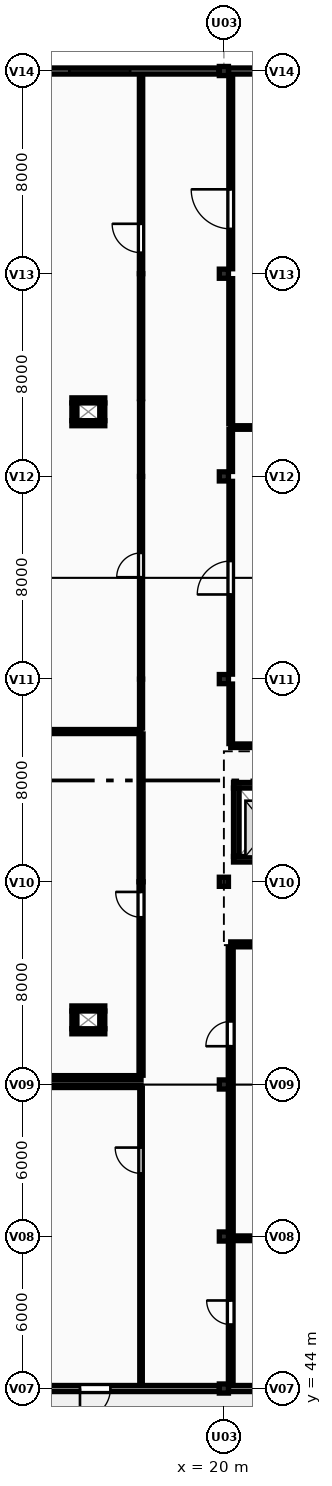
"""IFC4 building model, lengths in metres.
Left out: names, types, materials, properties, quantities, classifications, styles, units other than length and angle.
Written with IfcOpenShell. Run it as: python <this file> out.ifc"""

import sys

from ifc_helpers import new_model, si_unit, direction, frame, frame_2d, origin, origin_2d, place, context, subcontext, project, spatial, rectangle, extrude, element, fill, save


model = new_model("IFC4")
c1 = context("Model", 3, precision=1e-05, world=origin(), true_north=direction((0.0, 1.0)))
c2 = subcontext(c1, "Body", "Model", "MODEL_VIEW")
j1 = project(units=[si_unit("LENGTHUNIT", "METRE"), si_unit("PLANEANGLEUNIT", "RADIAN")], contexts=[c1])
p1 = place(None, origin())
s1 = spatial("IfcSite", under=j1, at=p1, CompositionType="ELEMENT")
p2 = place(p1, origin())
s2 = spatial("IfcBuilding", under=s1, at=p2, CompositionType="ELEMENT")
p3 = place(p2, frame((0.0, 0.0, 8.4)))
s3 = spatial("IfcBuildingStorey", under=s2, at=p3, CompositionType="ELEMENT", Elevation=8.4)
for number, where, z_axis, x_axis in (
    (1, (20.0, 44.0, 0.0), (0.0, 0.0, 1.0), (1.0, 0.0, 0.0)),
    (2, (20.0, 50.0, 0.0), (0.0, 0.0, 1.0), (1.0, 0.0, 0.0)),
    (3, (20.0, 56.0, 0.0), (0.0, 0.0, 1.0), (1.0, 0.0, 0.0)),
    (4, (20.0, 64.0, 0.0), (0.0, 0.0, 1.0), (1.0, 0.0, 0.0)),
    (5, (20.0, 72.0, 0.0), (0.0, 0.0, 1.0), (1.0, 0.0, 0.0)),
    (6, (20.0, 80.0, 0.0), (0.0, 0.0, 1.0), (1.0, 0.0, 0.0)),
    (7, (20.0, 88.0, 0.0), (0.0, 0.0, 1.0), (1.0, 0.0, 0.0)),
    (8, (20.0, 96.0, 0.0), (0.0, 0.0, 1.0), (1.0, 0.0, 0.0)),
):
    element("IfcColumn", number, at=place(p3, frame(where, z_axis=z_axis, x_axis=x_axis)), inside=s3, PredefinedType="COLUMN", context=c2, shape_type="SweptSolid", body=[
        extrude(rectangle(XDim=0.36, YDim=0.36, at=origin_2d()), origin(), (0.0, 0.0, 1.0), 3.9),
    ])
p4 = place(p3, frame((12.18, 96.0, 0.0), z_axis=(0.0, 0.0, 1.0), x_axis=(1.0, 0.0, 0.0)))
e9 = element("IfcWall", 9, at=p4, inside=s3, PredefinedType="SOLIDWALL", context=c2, shape_type="SweptSolid", body=[
    extrude(rectangle(XDim=7.64, YDim=0.24, at=frame_2d((3.82, 0.0))), origin(), (0.0, 0.0, 1.0), 3.09),
])
p5 = place(p4, frame((1.72, 0.0, 0.95)))
e10 = element("IfcOpeningElement", 10, at=p5, cuts=e9, PredefinedType="OPENING", context=c2, shape_type="SweptSolid", body=[
    extrude(rectangle(XDim=2.4, YDim=1.5, at=frame_2d((1.2, 0.75))), frame((0.0, 0.13, 0.0), z_axis=(0.0, -1.0, 0.0), x_axis=(1.0, 0.0, 0.0)), (0.0, 0.0, 1.0), 0.26),
])
p6 = place(p3, frame((20.18, 96.0, 0.0), z_axis=(0.0, 0.0, 1.0), x_axis=(1.0, 0.0, 0.0)))
e11 = element("IfcWall", 11, at=p6, inside=s3, PredefinedType="SOLIDWALL", context=c2, shape_type="SweptSolid", body=[
    extrude(rectangle(XDim=7.64, YDim=0.24, at=frame_2d((3.82, 0.0))), origin(), (0.0, 0.0, 1.0), 3.09),
])
p7 = place(p6, frame((3.22, 0.0, 0.95)))
e12 = element("IfcOpeningElement", 12, at=p7, cuts=e11, PredefinedType="OPENING", context=c2, shape_type="SweptSolid", body=[
    extrude(rectangle(XDim=1.2, YDim=1.65, at=frame_2d((0.6, 0.825))), frame((0.0, 0.13, 0.0), z_axis=(0.0, -1.0, 0.0), x_axis=(1.0, 0.0, 0.0)), (0.0, 0.0, 1.0), 0.26),
])
p8 = place(p3, frame((27.82, 44.0, 0.0), z_axis=(0.0, 0.0, 1.0), x_axis=(-1.0, 0.0, 0.0)))
e13 = element("IfcWall", 13, at=p8, inside=s3, PredefinedType="SOLIDWALL", context=c2, shape_type="SweptSolid", body=[
    extrude(rectangle(XDim=7.64, YDim=0.24, at=frame_2d((3.82, 0.0))), origin(), (0.0, 0.0, 1.0), 3.088),
])
p9 = place(p8, frame((2.57, 0.0, 0.95)))
e14 = element("IfcOpeningElement", 14, at=p9, cuts=e13, PredefinedType="OPENING", context=c2, shape_type="SweptSolid", body=[
    extrude(rectangle(XDim=2.5, YDim=1.65, at=frame_2d((1.25, 0.825))), frame((0.0, 0.13, 0.0), z_axis=(0.0, -1.0, 0.0), x_axis=(1.0, 0.0, 0.0)), (0.0, 0.0, 1.0), 0.26),
])
p10 = place(p3, frame((19.82, 44.0, 0.0), z_axis=(0.0, 0.0, 1.0), x_axis=(-1.0, 0.0, 0.0)))
e15 = element("IfcWall", 15, at=p10, inside=s3, PredefinedType="SOLIDWALL", context=c2, shape_type="SweptSolid", body=[
    extrude(rectangle(XDim=7.64, YDim=0.24, at=frame_2d((3.82, 0.0))), origin(), (0.0, 0.0, 1.0), 3.088),
])
p11 = place(p10, frame((4.3, 0.0, 0.0)))
e16 = element("IfcOpeningElement", 16, at=p11, cuts=e15, PredefinedType="OPENING", context=c2, shape_type="SweptSolid", body=[
    extrude(rectangle(XDim=1.2, YDim=2.15, at=frame_2d((0.6, 1.075))), frame((0.0, 0.13, 0.0), z_axis=(0.0, -1.0, 0.0), x_axis=(1.0, 0.0, 0.0)), (0.0, 0.0, 1.0), 0.26),
])
p12 = place(p3, frame((23.12, 64.89, 0.0), z_axis=(0.0, 0.0, 1.0), x_axis=(-1.0, 0.0, 0.0)))
e17 = element("IfcWall", 17, at=p12, inside=s3, PredefinedType="SHEAR", context=c2, shape_type="SweptSolid", body=[
    extrude(rectangle(XDim=2.74, YDim=0.22, at=frame_2d((1.37, 0.0))), origin(), (0.0, 0.0, 1.0), 3.65),
])
p13 = place(p12, frame((0.87, 0.0, 0.0)))
e18 = element("IfcOpeningElement", 18, at=p13, cuts=e17, PredefinedType="OPENING", context=c2, shape_type="SweptSolid", body=[
    extrude(rectangle(XDim=1.0, YDim=2.15, at=frame_2d((0.5, 1.075))), frame((0.0, 0.12, 0.0), z_axis=(0.0, -1.0, 0.0), x_axis=(1.0, 0.0, 0.0)), (0.0, 0.0, 1.0), 0.24),
])
p14 = place(p3, frame((20.38, 67.81, 0.0), z_axis=(0.0, 0.0, 1.0), x_axis=(1.0, 0.0, 0.0)))
e19 = element("IfcWall", 19, at=p14, inside=s3, PredefinedType="SHEAR", context=c2, shape_type="SweptSolid", body=[
    extrude(rectangle(XDim=2.74, YDim=0.22, at=frame_2d((1.37, 0.0))), origin(), (0.0, 0.0, 1.0), 3.65),
])
p15 = place(p3, frame((20.49, 65.0, 0.0), z_axis=(0.0, 0.0, 1.0), x_axis=(0.0, 1.0, 0.0)))
e20 = element("IfcWall", 20, at=p15, inside=s3, PredefinedType="SHEAR", context=c2, shape_type="SweptSolid", body=[
    extrude(rectangle(XDim=2.7, YDim=0.22, at=frame_2d((1.35, 0.0))), origin(), (0.0, 0.0, 1.0), 3.65),
])
for number, where, z_axis, x_axis in (
    (21, (15.3, 58.1, 0.0), (0.0, 0.0, 1.0), (-1.0, 0.0, 0.0)),
    (22, (14.0, 59.0, 0.0), (0.0, 0.0, 1.0), (1.0, 0.0, 0.0)),
):
    element("IfcWall", number, at=place(p3, frame(where, z_axis=z_axis, x_axis=x_axis)), inside=s3, PredefinedType="PARTITIONING", context=c2, shape_type="SweptSolid", body=[
        extrude(rectangle(XDim=1.3, YDim=0.2, at=frame_2d((0.65, 0.0))), origin(), (0.0, 0.0, 1.0), 3.65),
    ])
for number, where, z_axis, x_axis in (
    (23, (14.1, 58.2, 0.0), (0.0, 0.0, 1.0), (0.0, 1.0, 0.0)),
    (24, (15.2, 58.9, 0.0), (0.0, 0.0, 1.0), (0.0, -1.0, 0.0)),
):
    element("IfcWall", number, at=place(p3, frame(where, z_axis=z_axis, x_axis=x_axis)), inside=s3, PredefinedType="PARTITIONING", context=c2, shape_type="SweptSolid", body=[
        extrude(rectangle(XDim=0.7, YDim=0.2, at=frame_2d((0.35, 0.0))), origin(), (0.0, 0.0, 1.0), 3.65),
    ])
for number, where, z_axis, x_axis in (
    (25, (15.3, 82.1, 0.0), (0.0, 0.0, 1.0), (-1.0, 0.0, 0.0)),
    (26, (14.0, 83.0, 0.0), (0.0, 0.0, 1.0), (1.0, 0.0, 0.0)),
):
    element("IfcWall", number, at=place(p3, frame(where, z_axis=z_axis, x_axis=x_axis)), inside=s3, PredefinedType="PARTITIONING", context=c2, shape_type="SweptSolid", body=[
        extrude(rectangle(XDim=1.3, YDim=0.2, at=frame_2d((0.65, 0.0))), origin(), (0.0, 0.0, 1.0), 3.65),
    ])
for number, where, z_axis, x_axis in (
    (27, (14.1, 82.2, 0.0), (0.0, 0.0, 1.0), (0.0, 1.0, 0.0)),
    (28, (15.2, 82.9, 0.0), (0.0, 0.0, 1.0), (0.0, -1.0, 0.0)),
):
    element("IfcWall", number, at=place(p3, frame(where, z_axis=z_axis, x_axis=x_axis)), inside=s3, PredefinedType="PARTITIONING", context=c2, shape_type="SweptSolid", body=[
        extrude(rectangle(XDim=0.7, YDim=0.2, at=frame_2d((0.35, 0.0))), origin(), (0.0, 0.0, 1.0), 3.65),
    ])
p16 = place(p3, frame((12.195, 56.27, 0.0), z_axis=(0.0, 0.0, 1.0), x_axis=(1.0, 0.0, 0.0)))
e29 = element("IfcWall", 29, at=p16, inside=s3, PredefinedType="PARTITIONING", context=c2, shape_type="SweptSolid", body=[
    extrude(rectangle(XDim=4.535, YDim=0.16, at=frame_2d((2.268, 0.0))), origin(), (0.0, 0.0, 1.0), 3.088),
])
p17 = place(p3, frame((12.0, 69.93, 0.0), z_axis=(0.0, 0.0, 1.0), x_axis=(1.0, 0.0, 0.0)))
e30 = element("IfcWall", 30, at=p17, inside=s3, PredefinedType="PARTITIONING", context=c2, shape_type="SweptSolid", body=[
    extrude(rectangle(XDim=4.73, YDim=0.16, at=frame_2d((2.365, 0.0))), origin(), (0.0, 0.0, 1.0), 3.65),
])
p18 = place(p3, frame((16.73, 56.365, 0.0), z_axis=(0.0, 0.0, 1.0), x_axis=(0.0, 1.0, 0.0)))
e31 = element("IfcWall", 31, at=p18, inside=s3, PredefinedType="PARTITIONING", context=c2, shape_type="SweptSolid", body=[
    extrude(rectangle(XDim=7.635, YDim=0.16, at=frame_2d((3.817, 0.0))), origin(), (0.0, 0.0, 1.0), 3.65),
])
p19 = place(p18, frame((6.235, 0.0, 0.0)))
e32 = element("IfcOpeningElement", 32, at=p19, cuts=e31, PredefinedType="OPENING", context=c2, shape_type="SweptSolid", body=[
    extrude(rectangle(XDim=1.0, YDim=2.15, at=frame_2d((0.5, 1.075))), frame((0.0, 0.09, 0.0), z_axis=(0.0, -1.0, 0.0), x_axis=(1.0, 0.0, 0.0)), (0.0, 0.0, 1.0), 0.18),
])
p20 = place(p3, frame((16.73, 64.0, 0.0), z_axis=(0.0, 0.0, 1.0), x_axis=(0.0, 1.0, 0.0)))
e33 = element("IfcWall", 33, at=p20, inside=s3, PredefinedType="PARTITIONING", context=c2, shape_type="SweptSolid", body=[
    extrude(rectangle(XDim=5.835, YDim=0.16, at=frame_2d((2.917, 0.0))), origin(), (0.0, 0.0, 1.0), 3.65),
])
p21 = place(p3, frame((16.73, 70.07, 0.0), z_axis=(0.0, 0.0, 1.0), x_axis=(0.0, 1.0, 0.0)))
e34 = element("IfcWall", 34, at=p21, inside=s3, PredefinedType="PARTITIONING", context=c2, shape_type="SweptSolid", body=[
    extrude(rectangle(XDim=1.93, YDim=0.12, at=frame_2d((0.965, 0.0))), origin(), (0.0, 0.0, 1.0), 3.65),
])
p22 = place(p3, frame((16.73, 72.0, 0.0), z_axis=(0.0, 0.0, 1.0), x_axis=(0.0, 1.0, 0.0)))
e35 = element("IfcWall", 35, at=p22, inside=s3, PredefinedType="PARTITIONING", context=c2, shape_type="SweptSolid", body=[
    extrude(rectangle(XDim=8.0, YDim=0.12, at=frame_2d((4.0, 0.0))), origin(), (0.0, 0.0, 1.0), 3.65),
])
p23 = place(p22, frame((4.02, 0.0, 0.0)))
e36 = element("IfcOpeningElement", 36, at=p23, cuts=e35, PredefinedType="OPENING", context=c2, shape_type="SweptSolid", body=[
    extrude(rectangle(XDim=0.96, YDim=2.15, at=frame_2d((0.48, 1.075))), frame((0.0, 0.07, 0.0), z_axis=(0.0, -1.0, 0.0), x_axis=(1.0, 0.0, 0.0)), (0.0, 0.0, 1.0), 0.14),
])
p24 = place(p3, frame((16.73, 80.0, 0.0), z_axis=(0.0, 0.0, 1.0), x_axis=(0.0, 1.0, 0.0)))
e37 = element("IfcWall", 37, at=p24, inside=s3, PredefinedType="PARTITIONING", context=c2, shape_type="SweptSolid", body=[
    extrude(rectangle(XDim=2.93, YDim=0.12, at=frame_2d((1.465, 0.0))), origin(), (0.0, 0.0, 1.0), 3.65),
])
p25 = place(p3, frame((16.73, 83.07, 0.0), z_axis=(0.0, 0.0, 1.0), x_axis=(0.0, 1.0, 0.0)))
e38 = element("IfcWall", 38, at=p25, inside=s3, PredefinedType="PARTITIONING", context=c2, shape_type="SweptSolid", body=[
    extrude(rectangle(XDim=4.93, YDim=0.13, at=frame_2d((2.465, 0.0))), origin(), (0.0, 0.0, 1.0), 3.65),
])
p26 = place(p3, frame((16.73, 88.0, 0.0), z_axis=(0.0, 0.0, 1.0), x_axis=(0.0, 1.0, 0.0)))
e39 = element("IfcWall", 39, at=p26, inside=s3, PredefinedType="PARTITIONING", context=c2, shape_type="SweptSolid", body=[
    extrude(rectangle(XDim=7.838, YDim=0.13, at=frame_2d((3.919, 0.0))), origin(), (0.0, 0.0, 1.0), 3.65),
])
p27 = place(p26, frame((0.83, 0.0, 0.0)))
e40 = element("IfcOpeningElement", 40, at=p27, cuts=e39, PredefinedType="OPENING", context=c2, shape_type="SweptSolid", body=[
    extrude(rectangle(XDim=1.14, YDim=2.2, at=frame_2d((0.57, 1.1))), frame((0.0, 0.075, 0.0), z_axis=(0.0, -1.0, 0.0), x_axis=(1.0, 0.0, 0.0)), (0.0, 0.0, 1.0), 0.15),
])
for number, where, z_axis, x_axis in (
    (41, (20.27, 69.37, 0.0), (0.0, 0.0, 1.0), (1.0, 0.0, 0.0)),
    (42, (20.27, 81.93, 0.0), (0.0, 0.0, 1.0), (1.0, 0.0, 0.0)),
):
    element("IfcWall", number, at=place(p3, frame(where, z_axis=z_axis, x_axis=x_axis)), inside=s3, PredefinedType="PARTITIONING", context=c2, shape_type="SweptSolid", body=[
        extrude(rectangle(XDim=7.73, YDim=0.14, at=frame_2d((3.865, 0.0))), origin(), (0.0, 0.0, 1.0), 3.65),
    ])
p28 = place(p3, frame((20.27, 69.455, 0.0), z_axis=(0.0, 0.0, 1.0), x_axis=(0.0, 1.0, 0.0)))
e43 = element("IfcWall", 43, at=p28, inside=s3, PredefinedType="PARTITIONING", context=c2, shape_type="SweptSolid", body=[
    extrude(rectangle(XDim=2.35, YDim=0.14, at=frame_2d((1.175, 0.0))), origin(), (0.0, 0.0, 1.0), 3.09),
])
p29 = place(p3, frame((20.27, 72.195, 0.0), z_axis=(0.0, 0.0, 1.0), x_axis=(0.0, 1.0, 0.0)))
e44 = element("IfcWall", 44, at=p29, inside=s3, PredefinedType="PARTITIONING", context=c2, shape_type="SweptSolid", body=[
    extrude(rectangle(XDim=7.61, YDim=0.14, at=frame_2d((3.805, 0.0))), origin(), (0.0, 0.0, 1.0), 3.09),
])
p30 = place(p29, frame((3.145, 0.0, 0.0)))
e45 = element("IfcOpeningElement", 45, at=p30, cuts=e44, PredefinedType="OPENING", context=c2, shape_type="SweptSolid", body=[
    extrude(rectangle(XDim=1.32, YDim=2.2, at=frame_2d((0.66, 1.1))), frame((0.0, 0.08, 0.0), z_axis=(0.0, -1.0, 0.0), x_axis=(1.0, 0.0, 0.0)), (0.0, 0.0, 1.0), 0.16),
])
p31 = place(p3, frame((20.27, 80.195, 0.0), z_axis=(0.0, 0.0, 1.0), x_axis=(0.0, 1.0, 0.0)))
e46 = element("IfcWall", 46, at=p31, inside=s3, PredefinedType="PARTITIONING", context=c2, shape_type="SweptSolid", body=[
    extrude(rectangle(XDim=1.65, YDim=0.14, at=frame_2d((0.825, 0.0))), origin(), (0.0, 0.0, 1.0), 3.09),
])
p32 = place(p3, frame((20.27, 82.07, 0.0), z_axis=(0.0, 0.0, 1.0), x_axis=(0.0, 1.0, 0.0)))
e47 = element("IfcWall", 47, at=p32, inside=s3, PredefinedType="PARTITIONING", context=c2, shape_type="SweptSolid", body=[
    extrude(rectangle(XDim=5.735, YDim=0.15, at=frame_2d((2.867, 0.0))), origin(), (0.0, 0.0, 1.0), 3.09),
])
p33 = place(p3, frame((20.27, 88.195, 0.0), z_axis=(0.0, 0.0, 1.0), x_axis=(0.0, 1.0, 0.0)))
e48 = element("IfcWall", 48, at=p33, inside=s3, PredefinedType="PARTITIONING", context=c2, shape_type="SweptSolid", body=[
    extrude(rectangle(XDim=7.643, YDim=0.15, at=frame_2d((3.821, 0.0))), origin(), (0.0, 0.0, 1.0), 3.09),
])
p34 = place(p33, frame((1.575, 0.0, 0.0)))
e49 = element("IfcOpeningElement", 49, at=p34, cuts=e48, PredefinedType="OPENING", context=c2, shape_type="SweptSolid", body=[
    extrude(rectangle(XDim=1.56, YDim=2.25, at=frame_2d((0.78, 1.125))), frame((0.0, 0.085, 0.0), z_axis=(0.0, -1.0, 0.0), x_axis=(1.0, 0.0, 0.0)), (0.0, 0.0, 1.0), 0.17),
])
p35 = place(p3, frame((20.27, 49.93, 0.0), z_axis=(0.0, 0.0, 1.0), x_axis=(1.0, 0.0, 0.0)))
e50 = element("IfcWall", 50, at=p35, inside=s3, PredefinedType="PARTITIONING", context=c2, shape_type="SweptSolid", body=[
    extrude(rectangle(XDim=7.535, YDim=0.185, at=frame_2d((3.768, 0.0))), origin(), (0.0, 0.0, 1.0), 3.088),
])
p36 = place(p3, frame((20.27, 44.162, 0.0), z_axis=(0.0, 0.0, 1.0), x_axis=(0.0, 1.0, 0.0)))
e51 = element("IfcWall", 51, at=p36, inside=s3, PredefinedType="PARTITIONING", context=c2, shape_type="SweptSolid", body=[
    extrude(rectangle(XDim=5.66, YDim=0.185, at=frame_2d((2.83, 0.0))), origin(), (0.0, 0.0, 1.0), 3.088),
])
p37 = place(p36, frame((2.363, 0.0, 0.0)))
e52 = element("IfcOpeningElement", 52, at=p37, cuts=e51, PredefinedType="OPENING", context=c2, shape_type="SweptSolid", body=[
    extrude(rectangle(XDim=0.95, YDim=2.1, at=frame_2d((0.475, 1.05))), frame((0.0, 0.103, 0.0), z_axis=(0.0, -1.0, 0.0), x_axis=(1.0, 0.0, 0.0)), (0.0, 0.0, 1.0), 0.205),
])
p38 = place(p3, frame((20.27, 61.53, 0.0), z_axis=(0.0, 0.0, 1.0), x_axis=(1.0, 0.0, 0.0)))
e53 = element("IfcWall", 53, at=p38, inside=s3, PredefinedType="PARTITIONING", context=c2, shape_type="SweptSolid", body=[
    extrude(rectangle(XDim=7.73, YDim=0.195, at=frame_2d((3.865, 0.0))), origin(), (0.0, 0.0, 1.0), 3.65),
])
p39 = place(p3, frame((20.27, 50.195, 0.0), z_axis=(0.0, 0.0, 1.0), x_axis=(0.0, 1.0, 0.0)))
e54 = element("IfcWall", 54, at=p39, inside=s3, PredefinedType="PARTITIONING", context=c2, shape_type="SweptSolid", body=[
    extrude(rectangle(XDim=11.222, YDim=0.195, at=frame_2d((5.611, 0.0))), origin(), (0.0, 0.0, 1.0), 3.088),
])
p40 = place(p39, frame((7.315, 0.0, 0.0)))
e55 = element("IfcOpeningElement", 55, at=p40, cuts=e54, PredefinedType="OPENING", context=c2, shape_type="SweptSolid", body=[
    extrude(rectangle(XDim=0.98, YDim=2.1, at=frame_2d((0.49, 1.05))), frame((0.0, 0.107, 0.0), z_axis=(0.0, -1.0, 0.0), x_axis=(1.0, 0.0, 0.0)), (0.0, 0.0, 1.0), 0.215),
])
p41 = place(p3, frame((11.09, 55.93, 0.0), z_axis=(0.0, 0.0, 1.0), x_axis=(1.0, 0.0, 0.0)))
e56 = element("IfcWall", 56, at=p41, inside=s3, PredefinedType="PARTITIONING", context=c2, shape_type="SweptSolid", body=[
    extrude(rectangle(XDim=5.64, YDim=0.1, at=frame_2d((2.82, 0.0))), origin(), (0.0, 0.0, 1.0), 3.088),
])
p42 = place(p3, frame((16.73, 44.162, 0.0), z_axis=(0.0, 0.0, 1.0), x_axis=(0.0, 1.0, 0.0)))
e57 = element("IfcWall", 57, at=p42, inside=s3, PredefinedType="PARTITIONING", context=c2, shape_type="SweptSolid", body=[
    extrude(rectangle(XDim=11.703, YDim=0.1, at=frame_2d((5.852, 0.0))), origin(), (0.0, 0.0, 1.0), 3.65),
])
p43 = place(p42, frame((8.328, 0.0, 0.0)))
e58 = element("IfcOpeningElement", 58, at=p43, cuts=e57, PredefinedType="OPENING", context=c2, shape_type="SweptSolid", body=[
    extrude(rectangle(XDim=1.02, YDim=2.1, at=frame_2d((0.51, 1.05))), frame((0.0, 0.06, 0.0), z_axis=(0.0, -1.0, 0.0), x_axis=(1.0, 0.0, 0.0)), (0.0, 0.0, 1.0), 0.12),
])
p44 = place(p5, origin())
e59 = element("IfcWindow", 59, at=p44, inside=s3, PartitioningType="DOUBLE_PANEL_VERTICAL", PredefinedType="WINDOW", context=c2, shape_type="SweptSolid", body=[
    extrude(rectangle(XDim=2.4, YDim=1.5, at=frame_2d((1.2, 0.75))), frame((0.0, 0.03, 0.0), z_axis=(0.0, -1.0, 0.0), x_axis=(1.0, 0.0, 0.0)), (0.0, 0.0, 1.0), 0.06),
])
fill(e10, e59)
p45 = place(p11, origin())
e60 = element("IfcDoor", 60, at=p45, inside=s3, OperationType="SINGLE_SWING_RIGHT", PredefinedType="DOOR", context=c2, shape_type="SweptSolid", body=[
    extrude(rectangle(XDim=1.2, YDim=2.15, at=frame_2d((0.6, 1.075))), frame((0.0, 0.025, 0.0), z_axis=(0.0, -1.0, 0.0), x_axis=(1.0, 0.0, 0.0)), (0.0, 0.0, 1.0), 0.05),
])
fill(e16, e60)
p46 = place(p19, origin())
e61 = element("IfcDoor", 61, at=p46, inside=s3, OperationType="SINGLE_SWING_RIGHT", PredefinedType="DOOR", context=c2, shape_type="SweptSolid", body=[
    extrude(rectangle(XDim=1.0, YDim=2.15, at=frame_2d((0.5, 1.075))), frame((0.0, 0.025, 0.0), z_axis=(0.0, -1.0, 0.0), x_axis=(1.0, 0.0, 0.0)), (0.0, 0.0, 1.0), 0.05),
])
fill(e32, e61)
p47 = place(p23, origin())
e62 = element("IfcDoor", 62, at=p47, inside=s3, OperationType="SINGLE_SWING_LEFT", PredefinedType="DOOR", context=c2, shape_type="SweptSolid", body=[
    extrude(rectangle(XDim=0.96, YDim=2.15, at=frame_2d((0.48, 1.075))), frame((0.0, 0.025, 0.0), z_axis=(0.0, -1.0, 0.0), x_axis=(1.0, 0.0, 0.0)), (0.0, 0.0, 1.0), 0.05),
])
fill(e36, e62)
p48 = place(p27, origin())
e63 = element("IfcDoor", 63, at=p48, inside=s3, OperationType="SINGLE_SWING_RIGHT", PredefinedType="DOOR", context=c2, shape_type="SweptSolid", body=[
    extrude(rectangle(XDim=1.14, YDim=2.2, at=frame_2d((0.57, 1.1))), frame((0.0, 0.025, 0.0), z_axis=(0.0, -1.0, 0.0), x_axis=(1.0, 0.0, 0.0)), (0.0, 0.0, 1.0), 0.05),
])
fill(e40, e63)
p49 = place(p30, origin())
e64 = element("IfcDoor", 64, at=p49, inside=s3, OperationType="SINGLE_SWING_LEFT", PredefinedType="DOOR", context=c2, shape_type="SweptSolid", body=[
    extrude(rectangle(XDim=1.32, YDim=2.2, at=frame_2d((0.66, 1.1))), frame((0.0, 0.025, 0.0), z_axis=(0.0, -1.0, 0.0), x_axis=(1.0, 0.0, 0.0)), (0.0, 0.0, 1.0), 0.05),
])
fill(e45, e64)
p50 = place(p34, origin())
e65 = element("IfcDoor", 65, at=p50, inside=s3, OperationType="SINGLE_SWING_RIGHT", PredefinedType="DOOR", context=c2, shape_type="SweptSolid", body=[
    extrude(rectangle(XDim=1.56, YDim=2.25, at=frame_2d((0.78, 1.125))), frame((0.0, 0.025, 0.0), z_axis=(0.0, -1.0, 0.0), x_axis=(1.0, 0.0, 0.0)), (0.0, 0.0, 1.0), 0.05),
])
fill(e49, e65)
p51 = place(p37, origin())
e66 = element("IfcDoor", 66, at=p51, inside=s3, OperationType="SINGLE_SWING_RIGHT", PredefinedType="DOOR", context=c2, shape_type="SweptSolid", body=[
    extrude(rectangle(XDim=0.95, YDim=2.1, at=frame_2d((0.475, 1.05))), frame((0.0, 0.025, 0.0), z_axis=(0.0, -1.0, 0.0), x_axis=(1.0, 0.0, 0.0)), (0.0, 0.0, 1.0), 0.05),
])
fill(e52, e66)
p52 = place(p40, origin())
e67 = element("IfcDoor", 67, at=p52, inside=s3, OperationType="SINGLE_SWING_LEFT", PredefinedType="DOOR", context=c2, shape_type="SweptSolid", body=[
    extrude(rectangle(XDim=0.98, YDim=2.1, at=frame_2d((0.49, 1.05))), frame((0.0, 0.025, 0.0), z_axis=(0.0, -1.0, 0.0), x_axis=(1.0, 0.0, 0.0)), (0.0, 0.0, 1.0), 0.05),
])
fill(e55, e67)
p53 = place(p43, origin())
e68 = element("IfcDoor", 68, at=p53, inside=s3, OperationType="SINGLE_SWING_RIGHT", PredefinedType="DOOR", context=c2, shape_type="SweptSolid", body=[
    extrude(rectangle(XDim=1.02, YDim=2.1, at=frame_2d((0.51, 1.05))), frame((0.0, 0.025, 0.0), z_axis=(0.0, -1.0, 0.0), x_axis=(1.0, 0.0, 0.0)), (0.0, 0.0, 1.0), 0.05),
])
fill(e58, e68)
save(model, sys.argv[1])
